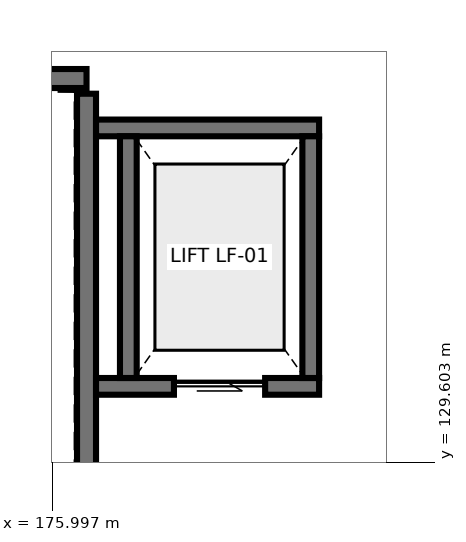
"""IFC4 building model, lengths in metres.
Left out: names, types, materials, properties, quantities, classifications, styles, units other than length and angle.
Written with IfcOpenShell. Run it as: python <this file> out.ifc"""

import sys

from ifc_helpers import new_model, si_unit, direction, frame, frame_2d, origin, place, context, subcontext, project, spatial, rectangle, extrude, element, fill, save


model = new_model("IFC4")
c1 = context("Model", 3, precision=1e-05, world=origin(), true_north=direction((0.0, 1.0)))
c2 = subcontext(c1, "Body", "Model", "MODEL_VIEW")
j1 = project(units=[si_unit("LENGTHUNIT", "METRE"), si_unit("PLANEANGLEUNIT", "RADIAN")], contexts=[c1])
p1 = place(None, origin())
s1 = spatial("IfcSite", under=j1, at=p1, CompositionType="ELEMENT")
p2 = place(p1, origin())
s2 = spatial("IfcBuilding", under=s1, at=p2, CompositionType="ELEMENT")
p3 = place(p2, frame((0.0, 0.0, -5.4)))
s3 = spatial("IfcBuildingStorey", under=s2, at=p3, CompositionType="ELEMENT", Elevation=-5.4)
p4 = place(p3, frame((168.15, 134.65, 0.0), z_axis=(0.0, 0.0, 1.0), x_axis=(1.0, 0.0, 0.0)))
e1 = element("IfcWall", 1, at=p4, inside=s3, PredefinedType="SHEAR", context=c2, shape_type="SweptSolid", body=[
    extrude(rectangle(XDim=8.3, YDim=0.25, at=frame_2d((4.15, 0.0))), origin(), (0.0, 0.0, 1.0), 5.1),
])
p5 = place(p3, frame((176.45, 134.45, 0.0), z_axis=(0.0, 0.0, 1.0), x_axis=(0.0, -1.0, 0.0)))
e2 = element("IfcWall", 2, at=p5, inside=s3, PredefinedType="SHEAR", context=c2, shape_type="SweptSolid", body=[
    extrude(rectangle(XDim=5.3, YDim=0.25, at=frame_2d((2.65, 0.0))), origin(), (0.0, 0.0, 1.0), 5.1),
])
p6 = place(p3, frame((176.575, 130.6, 0.0), z_axis=(0.0, 0.0, 1.0), x_axis=(1.0, 0.0, 0.0)))
e3 = element("IfcWall", 3, at=p6, inside=s3, PredefinedType="SHEAR", context=c2, shape_type="SweptSolid", body=[
    extrude(rectangle(XDim=2.935, YDim=0.22, at=frame_2d((1.468, 0.0))), origin(), (0.0, 0.0, 1.0), 5.1),
])
p7 = place(p6, frame((1.025, 0.0, 0.0)))
e4 = element("IfcOpeningElement", 4, at=p7, cuts=e3, PredefinedType="OPENING", context=c2, shape_type="SweptSolid", body=[
    extrude(rectangle(XDim=1.2, YDim=2.25, at=frame_2d((0.6, 1.125))), frame((0.0, 0.12, 0.0), z_axis=(0.0, -1.0, 0.0), x_axis=(1.0, 0.0, 0.0)), (0.0, 0.0, 1.0), 0.24),
])
p8 = place(p3, frame((176.575, 134.0, 0.0), z_axis=(0.0, 0.0, 1.0), x_axis=(1.0, 0.0, 0.0)))
e5 = element("IfcWall", 5, at=p8, inside=s3, PredefinedType="SHEAR", context=c2, shape_type="SweptSolid", body=[
    extrude(rectangle(XDim=2.935, YDim=0.22, at=frame_2d((1.468, 0.0))), origin(), (0.0, 0.0, 1.0), 5.1),
])
for number, where, z_axis, x_axis in (
    (6, (177.0, 130.71, 0.0), (0.0, 0.0, 1.0), (0.0, 1.0, 0.0)),
    (7, (179.4, 130.71, 0.0), (0.0, 0.0, 1.0), (0.0, 1.0, 0.0)),
):
    element("IfcWall", number, at=place(p3, frame(where, z_axis=z_axis, x_axis=x_axis)), inside=s3, PredefinedType="SHEAR", context=c2, shape_type="SweptSolid", body=[
        extrude(rectangle(XDim=3.18, YDim=0.22, at=frame_2d((1.59, 0.0))), origin(), (0.0, 0.0, 1.0), 5.1),
    ])
p9 = place(p7, origin())
e8 = element("IfcDoor", 8, at=p9, inside=s3, OperationType="SLIDING_TO_LEFT", PredefinedType="DOOR", context=c2, shape_type="SweptSolid", body=[
    extrude(rectangle(XDim=1.2, YDim=2.25, at=frame_2d((0.6, 1.125))), frame((0.0, 0.025, 0.0), z_axis=(0.0, -1.0, 0.0), x_axis=(1.0, 0.0, 0.0)), (0.0, 0.0, 1.0), 0.05),
])
fill(e4, e8)
save(model, sys.argv[1])
